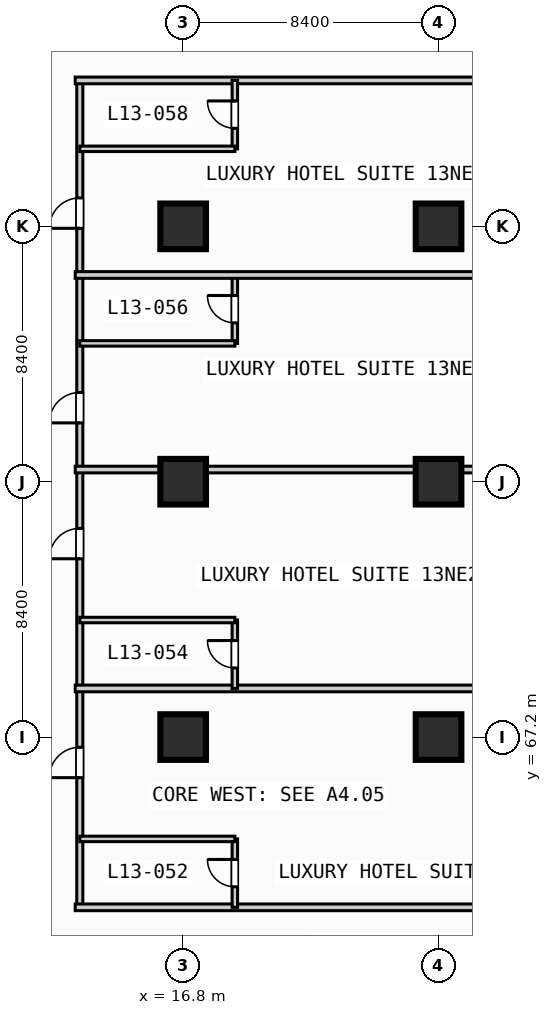
"""IFC4 building model, lengths in metres.
Left out: names, types, materials, properties, quantities, classifications, styles, units other than length and angle.
Written with IfcOpenShell. Run it as: python <this file> out.ifc"""

import sys

from ifc_helpers import new_model, si_unit, direction, frame, frame_2d, origin, origin_2d, place, context, subcontext, project, spatial, rectangle, extrude, element, fill, save


model = new_model("IFC4")
c1 = context("Model", 3, precision=1e-05, world=origin(), true_north=direction((0.0, 1.0)))
c2 = subcontext(c1, "Body", "Model", "MODEL_VIEW")
j1 = project(units=[si_unit("LENGTHUNIT", "METRE"), si_unit("PLANEANGLEUNIT", "RADIAN")], contexts=[c1])
p1 = place(None, origin())
s1 = spatial("IfcSite", under=j1, at=p1, CompositionType="ELEMENT")
p2 = place(p1, origin())
s2 = spatial("IfcBuilding", under=s1, at=p2, CompositionType="ELEMENT")
p3 = place(p2, frame((0.0, 0.0, 58.6)))
s3 = spatial("IfcBuildingStorey", under=s2, at=p3, CompositionType="ELEMENT", Elevation=58.6)
for number, where, z_axis, x_axis in (
    (1, (16.8, 67.2, 0.0), (0.0, 0.0, 1.0), (1.0, 0.0, 0.0)),
    (2, (16.8, 75.6, 0.0), (0.0, 0.0, 1.0), (1.0, 0.0, 0.0)),
    (3, (16.8, 84.0, 0.0), (0.0, 0.0, 1.0), (1.0, 0.0, 0.0)),
    (4, (25.2, 67.2, 0.0), (0.0, 0.0, 1.0), (1.0, 0.0, 0.0)),
    (5, (25.2, 75.6, 0.0), (0.0, 0.0, 1.0), (1.0, 0.0, 0.0)),
    (6, (25.2, 84.0, 0.0), (0.0, 0.0, 1.0), (1.0, 0.0, 0.0)),
):
    element("IfcColumn", number, at=place(p3, frame(where, z_axis=z_axis, x_axis=x_axis)), inside=s3, PredefinedType="COLUMN", context=c2, shape_type="SweptSolid", body=[
        extrude(rectangle(XDim=1.5, YDim=1.5, at=origin_2d()), origin(), (0.0, 0.0, 1.0), 3.8),
    ])
p4 = place(p3, frame((13.4, 61.6, 0.0), z_axis=(0.0, 0.0, 1.0), x_axis=(0.0, 1.0, 0.0)))
e7 = element("IfcWall", 7, at=p4, inside=s3, PredefinedType="PARTITIONING", context=c2, shape_type="SweptSolid", body=[
    extrude(rectangle(XDim=27.2, YDim=0.2, at=frame_2d((13.6, 0.0))), origin(), (0.0, 0.0, 1.0), 3.55),
])
p5 = place(p4, frame((4.265, 0.0, 0.0)))
e8 = element("IfcOpeningElement", 8, at=p5, cuts=e7, PredefinedType="OPENING", context=c2, shape_type="SweptSolid", body=[
    extrude(rectangle(XDim=1.0, YDim=2.15, at=frame_2d((0.5, 1.075))), frame((0.0, 0.11, 0.0), z_axis=(0.0, -1.0, 0.0), x_axis=(1.0, 0.0, 0.0)), (0.0, 0.0, 1.0), 0.22),
])
p6 = place(p4, frame((11.465, 0.0, 0.0)))
e9 = element("IfcOpeningElement", 9, at=p6, cuts=e7, PredefinedType="OPENING", context=c2, shape_type="SweptSolid", body=[
    extrude(rectangle(XDim=1.0, YDim=2.15, at=frame_2d((0.5, 1.075))), frame((0.0, 0.11, 0.0), z_axis=(0.0, -1.0, 0.0), x_axis=(1.0, 0.0, 0.0)), (0.0, 0.0, 1.0), 0.22),
])
p7 = place(p4, frame((15.935, 0.0, 0.0)))
e10 = element("IfcOpeningElement", 10, at=p7, cuts=e7, PredefinedType="OPENING", context=c2, shape_type="SweptSolid", body=[
    extrude(rectangle(XDim=1.0, YDim=2.15, at=frame_2d((0.5, 1.075))), frame((0.0, 0.11, 0.0), z_axis=(0.0, -1.0, 0.0), x_axis=(1.0, 0.0, 0.0)), (0.0, 0.0, 1.0), 0.22),
])
p8 = place(p4, frame((22.335, 0.0, 0.0)))
e11 = element("IfcOpeningElement", 11, at=p8, cuts=e7, PredefinedType="OPENING", context=c2, shape_type="SweptSolid", body=[
    extrude(rectangle(XDim=1.0, YDim=2.15, at=frame_2d((0.5, 1.075))), frame((0.0, 0.11, 0.0), z_axis=(0.0, -1.0, 0.0), x_axis=(1.0, 0.0, 0.0)), (0.0, 0.0, 1.0), 0.22),
])
p9 = place(p3, frame((13.25, 61.6, 0.0), z_axis=(0.0, 0.0, 1.0), x_axis=(1.0, 0.0, 0.0)))
e12 = element("IfcWall", 12, at=p9, inside=s3, PredefinedType="PARTITIONING", context=c2, shape_type="SweptSolid", body=[
    extrude(rectangle(XDim=20.18, YDim=0.22, at=frame_2d((10.09, 0.0))), origin(), (0.0, 0.0, 1.0), 3.55),
])
p10 = place(p3, frame((18.5, 61.6, 0.0), z_axis=(0.0, 0.0, 1.0), x_axis=(0.0, 1.0, 0.0)))
e13 = element("IfcWall", 13, at=p10, inside=s3, PredefinedType="PLUMBINGWALL", context=c2, shape_type="SweptSolid", body=[
    extrude(rectangle(XDim=2.25, YDim=0.18, at=frame_2d((1.125, 0.0))), origin(), (0.0, 0.0, 1.0), 3.55),
])
p11 = place(p10, frame((0.675, 0.0, 0.0)))
e14 = element("IfcOpeningElement", 14, at=p11, cuts=e13, PredefinedType="OPENING", context=c2, shape_type="SweptSolid", body=[
    extrude(rectangle(XDim=0.9, YDim=2.1, at=frame_2d((0.45, 1.05))), frame((0.0, 0.1, 0.0), z_axis=(0.0, -1.0, 0.0), x_axis=(1.0, 0.0, 0.0)), (0.0, 0.0, 1.0), 0.2),
])
p12 = place(p3, frame((13.4, 63.85, 0.0), z_axis=(0.0, 0.0, 1.0), x_axis=(1.0, 0.0, 0.0)))
e15 = element("IfcWall", 15, at=p12, inside=s3, PredefinedType="PLUMBINGWALL", context=c2, shape_type="SweptSolid", body=[
    extrude(rectangle(XDim=5.1, YDim=0.18, at=frame_2d((2.55, 0.0))), origin(), (0.0, 0.0, 1.0), 3.55),
])
p13 = place(p3, frame((13.25, 68.8, 0.0), z_axis=(0.0, 0.0, 1.0), x_axis=(1.0, 0.0, 0.0)))
e16 = element("IfcWall", 16, at=p13, inside=s3, PredefinedType="PARTITIONING", context=c2, shape_type="SweptSolid", body=[
    extrude(rectangle(XDim=20.18, YDim=0.22, at=frame_2d((10.09, 0.0))), origin(), (0.0, 0.0, 1.0), 3.55),
])
p14 = place(p3, frame((18.5, 68.8, 0.0), z_axis=(0.0, 0.0, 1.0), x_axis=(0.0, 1.0, 0.0)))
e17 = element("IfcWall", 17, at=p14, inside=s3, PredefinedType="PLUMBINGWALL", context=c2, shape_type="SweptSolid", body=[
    extrude(rectangle(XDim=2.25, YDim=0.18, at=frame_2d((1.125, 0.0))), origin(), (0.0, 0.0, 1.0), 3.55),
])
p15 = place(p14, frame((0.675, 0.0, 0.0)))
e18 = element("IfcOpeningElement", 18, at=p15, cuts=e17, PredefinedType="OPENING", context=c2, shape_type="SweptSolid", body=[
    extrude(rectangle(XDim=0.9, YDim=2.1, at=frame_2d((0.45, 1.05))), frame((0.0, 0.1, 0.0), z_axis=(0.0, -1.0, 0.0), x_axis=(1.0, 0.0, 0.0)), (0.0, 0.0, 1.0), 0.2),
])
p16 = place(p3, frame((13.4, 71.05, 0.0), z_axis=(0.0, 0.0, 1.0), x_axis=(1.0, 0.0, 0.0)))
e19 = element("IfcWall", 19, at=p16, inside=s3, PredefinedType="PLUMBINGWALL", context=c2, shape_type="SweptSolid", body=[
    extrude(rectangle(XDim=5.1, YDim=0.18, at=frame_2d((2.55, 0.0))), origin(), (0.0, 0.0, 1.0), 3.55),
])
p17 = place(p3, frame((13.25, 76.0, 0.0), z_axis=(0.0, 0.0, 1.0), x_axis=(1.0, 0.0, 0.0)))
e20 = element("IfcWall", 20, at=p17, inside=s3, PredefinedType="PARTITIONING", context=c2, shape_type="SweptSolid", body=[
    extrude(rectangle(XDim=20.18, YDim=0.22, at=frame_2d((10.09, 0.0))), origin(), (0.0, 0.0, 1.0), 3.55),
])
p18 = place(p3, frame((18.5, 80.15, 0.0), z_axis=(0.0, 0.0, 1.0), x_axis=(0.0, 1.0, 0.0)))
e21 = element("IfcWall", 21, at=p18, inside=s3, PredefinedType="PLUMBINGWALL", context=c2, shape_type="SweptSolid", body=[
    extrude(rectangle(XDim=2.25, YDim=0.18, at=frame_2d((1.125, 0.0))), origin(), (0.0, 0.0, 1.0), 3.55),
])
p19 = place(p18, frame((0.675, 0.0, 0.0)))
e22 = element("IfcOpeningElement", 22, at=p19, cuts=e21, PredefinedType="OPENING", context=c2, shape_type="SweptSolid", body=[
    extrude(rectangle(XDim=0.9, YDim=2.1, at=frame_2d((0.45, 1.05))), frame((0.0, 0.1, 0.0), z_axis=(0.0, -1.0, 0.0), x_axis=(1.0, 0.0, 0.0)), (0.0, 0.0, 1.0), 0.2),
])
p20 = place(p3, frame((13.4, 80.15, 0.0), z_axis=(0.0, 0.0, 1.0), x_axis=(1.0, 0.0, 0.0)))
e23 = element("IfcWall", 23, at=p20, inside=s3, PredefinedType="PLUMBINGWALL", context=c2, shape_type="SweptSolid", body=[
    extrude(rectangle(XDim=5.1, YDim=0.18, at=frame_2d((2.55, 0.0))), origin(), (0.0, 0.0, 1.0), 3.55),
])
for number, where, z_axis, x_axis in (
    (24, (13.25, 82.4, 0.0), (0.0, 0.0, 1.0), (1.0, 0.0, 0.0)),
    (25, (13.25, 88.8, 0.0), (0.0, 0.0, 1.0), (1.0, 0.0, 0.0)),
):
    element("IfcWall", number, at=place(p3, frame(where, z_axis=z_axis, x_axis=x_axis)), inside=s3, PredefinedType="PARTITIONING", context=c2, shape_type="SweptSolid", body=[
        extrude(rectangle(XDim=20.18, YDim=0.22, at=frame_2d((10.09, 0.0))), origin(), (0.0, 0.0, 1.0), 3.55),
    ])
p21 = place(p3, frame((18.5, 86.55, 0.0), z_axis=(0.0, 0.0, 1.0), x_axis=(0.0, 1.0, 0.0)))
e26 = element("IfcWall", 26, at=p21, inside=s3, PredefinedType="PLUMBINGWALL", context=c2, shape_type="SweptSolid", body=[
    extrude(rectangle(XDim=2.25, YDim=0.18, at=frame_2d((1.125, 0.0))), origin(), (0.0, 0.0, 1.0), 3.55),
])
p22 = place(p21, frame((0.675, 0.0, 0.0)))
e27 = element("IfcOpeningElement", 27, at=p22, cuts=e26, PredefinedType="OPENING", context=c2, shape_type="SweptSolid", body=[
    extrude(rectangle(XDim=0.9, YDim=2.1, at=frame_2d((0.45, 1.05))), frame((0.0, 0.1, 0.0), z_axis=(0.0, -1.0, 0.0), x_axis=(1.0, 0.0, 0.0)), (0.0, 0.0, 1.0), 0.2),
])
p23 = place(p3, frame((13.4, 86.55, 0.0), z_axis=(0.0, 0.0, 1.0), x_axis=(1.0, 0.0, 0.0)))
e28 = element("IfcWall", 28, at=p23, inside=s3, PredefinedType="PLUMBINGWALL", context=c2, shape_type="SweptSolid", body=[
    extrude(rectangle(XDim=5.1, YDim=0.18, at=frame_2d((2.55, 0.0))), origin(), (0.0, 0.0, 1.0), 3.55),
])
p24 = place(p5, origin())
e29 = element("IfcDoor", 29, at=p24, inside=s3, OperationType="SINGLE_SWING_LEFT", PredefinedType="DOOR", context=c2, shape_type="SweptSolid", body=[
    extrude(rectangle(XDim=1.0, YDim=2.15, at=frame_2d((0.5, 1.075))), frame((0.0, 0.025, 0.0), z_axis=(0.0, -1.0, 0.0), x_axis=(1.0, 0.0, 0.0)), (0.0, 0.0, 1.0), 0.05),
])
fill(e8, e29)
p25 = place(p6, origin())
e30 = element("IfcDoor", 30, at=p25, inside=s3, OperationType="SINGLE_SWING_LEFT", PredefinedType="DOOR", context=c2, shape_type="SweptSolid", body=[
    extrude(rectangle(XDim=1.0, YDim=2.15, at=frame_2d((0.5, 1.075))), frame((0.0, 0.025, 0.0), z_axis=(0.0, -1.0, 0.0), x_axis=(1.0, 0.0, 0.0)), (0.0, 0.0, 1.0), 0.05),
])
fill(e9, e30)
p26 = place(p7, origin())
e31 = element("IfcDoor", 31, at=p26, inside=s3, OperationType="SINGLE_SWING_LEFT", PredefinedType="DOOR", context=c2, shape_type="SweptSolid", body=[
    extrude(rectangle(XDim=1.0, YDim=2.15, at=frame_2d((0.5, 1.075))), frame((0.0, 0.025, 0.0), z_axis=(0.0, -1.0, 0.0), x_axis=(1.0, 0.0, 0.0)), (0.0, 0.0, 1.0), 0.05),
])
fill(e10, e31)
p27 = place(p8, origin())
e32 = element("IfcDoor", 32, at=p27, inside=s3, OperationType="SINGLE_SWING_LEFT", PredefinedType="DOOR", context=c2, shape_type="SweptSolid", body=[
    extrude(rectangle(XDim=1.0, YDim=2.15, at=frame_2d((0.5, 1.075))), frame((0.0, 0.025, 0.0), z_axis=(0.0, -1.0, 0.0), x_axis=(1.0, 0.0, 0.0)), (0.0, 0.0, 1.0), 0.05),
])
fill(e11, e32)
p28 = place(p11, origin())
e33 = element("IfcDoor", 33, at=p28, inside=s3, OperationType="SINGLE_SWING_RIGHT", PredefinedType="DOOR", context=c2, shape_type="SweptSolid", body=[
    extrude(rectangle(XDim=0.9, YDim=2.1, at=frame_2d((0.45, 1.05))), frame((0.0, 0.025, 0.0), z_axis=(0.0, -1.0, 0.0), x_axis=(1.0, 0.0, 0.0)), (0.0, 0.0, 1.0), 0.05),
])
fill(e14, e33)
p29 = place(p15, origin())
e34 = element("IfcDoor", 34, at=p29, inside=s3, OperationType="SINGLE_SWING_RIGHT", PredefinedType="DOOR", context=c2, shape_type="SweptSolid", body=[
    extrude(rectangle(XDim=0.9, YDim=2.1, at=frame_2d((0.45, 1.05))), frame((0.0, 0.025, 0.0), z_axis=(0.0, -1.0, 0.0), x_axis=(1.0, 0.0, 0.0)), (0.0, 0.0, 1.0), 0.05),
])
fill(e18, e34)
p30 = place(p19, origin())
e35 = element("IfcDoor", 35, at=p30, inside=s3, OperationType="SINGLE_SWING_RIGHT", PredefinedType="DOOR", context=c2, shape_type="SweptSolid", body=[
    extrude(rectangle(XDim=0.9, YDim=2.1, at=frame_2d((0.45, 1.05))), frame((0.0, 0.025, 0.0), z_axis=(0.0, -1.0, 0.0), x_axis=(1.0, 0.0, 0.0)), (0.0, 0.0, 1.0), 0.05),
])
fill(e22, e35)
p31 = place(p22, origin())
e36 = element("IfcDoor", 36, at=p31, inside=s3, OperationType="SINGLE_SWING_RIGHT", PredefinedType="DOOR", context=c2, shape_type="SweptSolid", body=[
    extrude(rectangle(XDim=0.9, YDim=2.1, at=frame_2d((0.45, 1.05))), frame((0.0, 0.025, 0.0), z_axis=(0.0, -1.0, 0.0), x_axis=(1.0, 0.0, 0.0)), (0.0, 0.0, 1.0), 0.05),
])
fill(e27, e36)
save(model, sys.argv[1])
